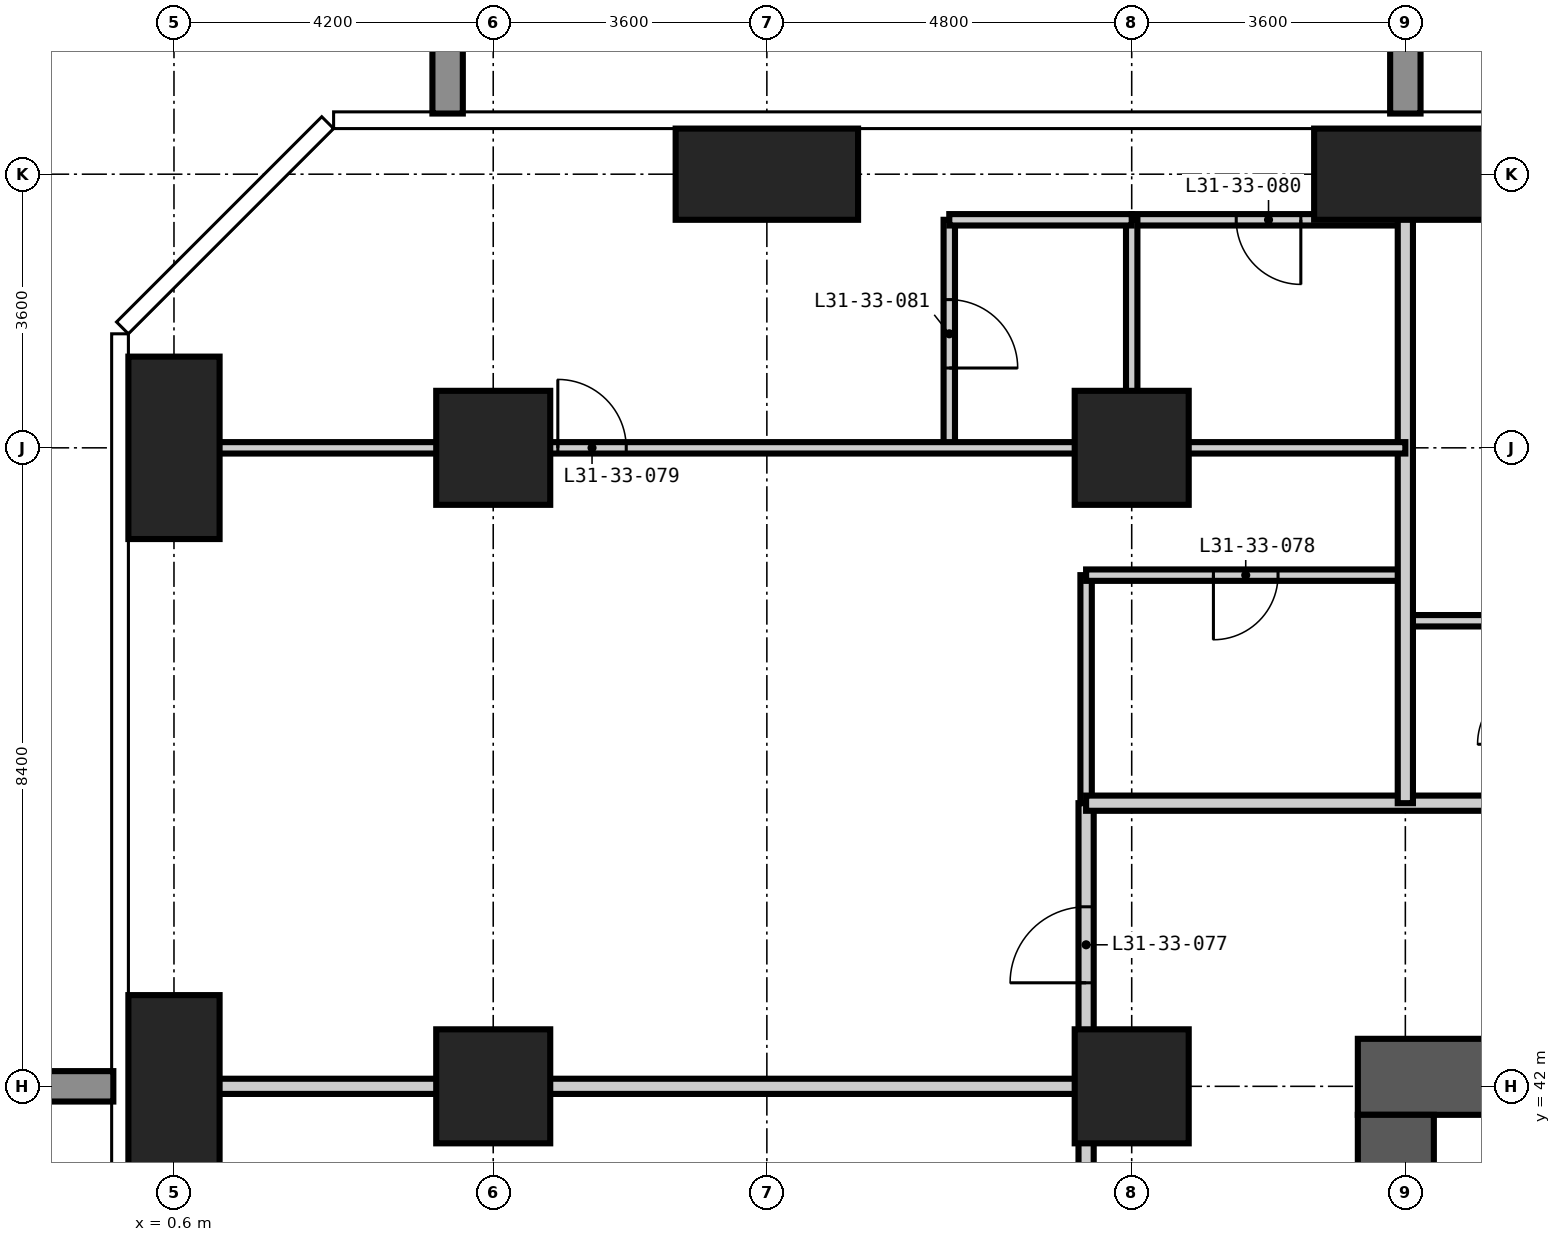
"""IFC4 building model, lengths in metres.
Left out: names, types, materials, properties, quantities, classifications, styles, units other than length and angle.
Written with IfcOpenShell. Run it as: python <this file> out.ifc"""

import sys

from ifc_helpers import new_model, si_unit, direction, frame, frame_2d, origin, origin_2d, place, context, subcontext, project, spatial, rectangle, extrude, element, fill, save


model = new_model("IFC4")
c1 = context("Model", 3, precision=1e-05, world=origin(), true_north=direction((0.0, 1.0)))
c2 = subcontext(c1, "Body", "Model", "MODEL_VIEW")
j1 = project(units=[si_unit("LENGTHUNIT", "METRE"), si_unit("PLANEANGLEUNIT", "RADIAN")], contexts=[c1])
p1 = place(None, origin())
s1 = spatial("IfcSite", under=j1, at=p1, CompositionType="ELEMENT")
p2 = place(p1, origin())
s2 = spatial("IfcBuilding", under=s1, at=p2, CompositionType="ELEMENT")
p3 = place(p2, frame((0.0, 0.0, 122.4)))
s3 = spatial("IfcBuildingStorey", under=s2, at=p3, CompositionType="ELEMENT", Elevation=122.4)
for number, where, z_axis, x_axis in (
    (1, (0.6, 42.0, -0.35), (0.0, 0.0, 1.0), (1.0, 0.0, 0.0)),
    (2, (0.6, 50.4, -0.35), (0.0, 0.0, 1.0), (1.0, 0.0, 0.0)),
):
    element("IfcColumn", number, at=place(p3, frame(where, z_axis=z_axis, x_axis=x_axis)), inside=s3, PredefinedType="COLUMN", context=c2, shape_type="SweptSolid", body=[
        extrude(rectangle(XDim=1.2, YDim=2.4, at=origin_2d()), origin(), (0.0, 0.0, 1.0), 3.6),
    ])
for number, where, z_axis, x_axis in (
    (3, (4.8, 42.0, -0.35), (0.0, 0.0, 1.0), (1.0, 0.0, 0.0)),
    (4, (4.8, 50.4, -0.35), (0.0, 0.0, 1.0), (1.0, 0.0, 0.0)),
):
    element("IfcColumn", number, at=place(p3, frame(where, z_axis=z_axis, x_axis=x_axis)), inside=s3, PredefinedType="COLUMN", context=c2, shape_type="SweptSolid", body=[
        extrude(rectangle(XDim=1.5, YDim=1.5, at=origin_2d()), origin(), (0.0, 0.0, 1.0), 3.6),
    ])
p4 = place(p3, frame((8.4, 54.0, -0.35), z_axis=(0.0, 0.0, 1.0), x_axis=(1.0, 0.0, 0.0)))
e5 = element("IfcColumn", 5, at=p4, inside=s3, PredefinedType="COLUMN", context=c2, shape_type="SweptSolid", body=[
    extrude(rectangle(XDim=2.4, YDim=1.2, at=origin_2d()), origin(), (0.0, 0.0, 1.0), 3.6),
])
for number, where, z_axis, x_axis in (
    (6, (13.2, 42.0, -0.35), (0.0, 0.0, 1.0), (1.0, 0.0, 0.0)),
    (7, (13.2, 50.4, -0.35), (0.0, 0.0, 1.0), (1.0, 0.0, 0.0)),
):
    element("IfcColumn", number, at=place(p3, frame(where, z_axis=z_axis, x_axis=x_axis)), inside=s3, PredefinedType="COLUMN", context=c2, shape_type="SweptSolid", body=[
        extrude(rectangle(XDim=1.5, YDim=1.5, at=origin_2d()), origin(), (0.0, 0.0, 1.0), 3.6),
    ])
p5 = place(p3, frame((16.8, 54.0, -0.35), z_axis=(0.0, 0.0, 1.0), x_axis=(1.0, 0.0, 0.0)))
e8 = element("IfcColumn", 8, at=p5, inside=s3, PredefinedType="COLUMN", context=c2, shape_type="SweptSolid", body=[
    extrude(rectangle(XDim=2.4, YDim=1.2, at=origin_2d()), origin(), (0.0, 0.0, 1.0), 3.6),
])
p6 = place(p3, frame((42.625, 42.125, -0.35), z_axis=(0.0, 0.0, 1.0), x_axis=(-1.0, 0.0, 0.0)))
e9 = element("IfcWall", 9, at=p6, inside=s3, PredefinedType="SHEAR", context=c2, shape_type="SweptSolid", body=[
    extrude(rectangle(XDim=26.45, YDim=1.0, at=frame_2d((13.225, 0.0))), origin(), (0.0, 0.0, 1.0), 3.6),
])
p7 = place(p6, frame((21.125, 0.0, 0.35)))
e10 = element("IfcOpeningElement", 10, at=p7, cuts=e9, PredefinedType="OPENING", context=c2, shape_type="SweptSolid", body=[
    extrude(rectangle(XDim=1.0, YDim=2.1, at=frame_2d((0.5, 1.05))), frame((0.0, 0.51, 0.0), z_axis=(0.0, -1.0, 0.0), x_axis=(1.0, 0.0, 0.0)), (0.0, 0.0, 1.0), 1.02),
])
p8 = place(p6, frame((10.525, 0.0, 0.35)))
e11 = element("IfcOpeningElement", 11, at=p8, cuts=e9, PredefinedType="OPENING", context=c2, shape_type="SweptSolid", body=[
    extrude(rectangle(XDim=1.2, YDim=2.2, at=frame_2d((0.6, 1.1))), frame((0.0, 0.51, 0.0), z_axis=(0.0, -1.0, 0.0), x_axis=(1.0, 0.0, 0.0)), (0.0, 0.0, 1.0), 1.02),
])
p9 = place(p3, frame((16.675, 41.625, -0.35), z_axis=(0.0, 0.0, 1.0), x_axis=(0.0, -1.0, 0.0)))
e12 = element("IfcWall", 12, at=p9, inside=s3, PredefinedType="SHEAR", context=c2, shape_type="SweptSolid", body=[
    extrude(rectangle(XDim=24.45, YDim=1.0, at=frame_2d((12.225, 0.0))), origin(), (0.0, 0.0, 1.0), 3.6),
])
p10 = place(p9, frame((11.325, 0.0, 0.35)))
e13 = element("IfcOpeningElement", 13, at=p10, cuts=e12, PredefinedType="OPENING", context=c2, shape_type="SweptSolid", body=[
    extrude(rectangle(XDim=1.8, YDim=2.2, at=frame_2d((0.9, 1.1))), frame((0.0, 0.51, 0.0), z_axis=(0.0, -1.0, 0.0), x_axis=(1.0, 0.0, 0.0)), (0.0, 0.0, 1.0), 1.02),
])
p11 = place(p9, frame((20.125, 0.0, 0.35)))
e14 = element("IfcOpeningElement", 14, at=p11, cuts=e12, PredefinedType="OPENING", context=c2, shape_type="SweptSolid", body=[
    extrude(rectangle(XDim=1.0, YDim=2.1, at=frame_2d((0.5, 1.05))), frame((0.0, 0.51, 0.0), z_axis=(0.0, -1.0, 0.0), x_axis=(1.0, 0.0, 0.0)), (0.0, 0.0, 1.0), 1.02),
])
p12 = place(p9, frame((5.425, 0.0, 0.35)))
e15 = element("IfcOpeningElement", 15, at=p12, cuts=e12, PredefinedType="OPENING", context=c2, shape_type="SweptSolid", body=[
    extrude(rectangle(XDim=1.0, YDim=2.1, at=frame_2d((0.5, 1.05))), frame((0.0, 0.51, 0.0), z_axis=(0.0, -1.0, 0.0), x_axis=(1.0, 0.0, 0.0)), (0.0, 0.0, 1.0), 1.02),
])
p13 = place(p3, frame((12.6, 45.725, 0.0), z_axis=(0.0, 0.0, 1.0), x_axis=(0.0, 1.0, 0.0)))
e16 = element("IfcWall", 16, at=p13, inside=s3, PredefinedType="PARTITIONING", context=c2, shape_type="SweptSolid", body=[
    extrude(rectangle(XDim=3.0, YDim=0.15, at=frame_2d((1.5, 0.0))), origin(), (0.0, 0.0, 1.0), 3.25),
])
p14 = place(p3, frame((16.8, 48.125, 0.0), z_axis=(0.0, 0.0, 1.0), x_axis=(1.0, 0.0, 0.0)))
e17 = element("IfcWall", 17, at=p14, inside=s3, PredefinedType="PARTITIONING", context=c2, shape_type="SweptSolid", body=[
    extrude(rectangle(XDim=1.8, YDim=0.15, at=frame_2d((0.9, 0.0))), origin(), (0.0, 0.0, 1.0), 3.25),
])
p15 = place(p3, frame((12.6, 48.725, 0.0), z_axis=(0.0, 0.0, 1.0), x_axis=(1.0, 0.0, 0.0)))
e18 = element("IfcWall", 18, at=p15, inside=s3, PredefinedType="PARTITIONING", context=c2, shape_type="SweptSolid", body=[
    extrude(rectangle(XDim=4.2, YDim=0.15, at=frame_2d((2.1, 0.0))), origin(), (0.0, 0.0, 1.0), 3.25),
])
p16 = place(p15, frame((1.675, 0.0, 0.0)))
e19 = element("IfcOpeningElement", 19, at=p16, cuts=e18, PredefinedType="OPENING", context=c2, shape_type="SweptSolid", body=[
    extrude(rectangle(XDim=0.85, YDim=2.1, at=frame_2d((0.425, 1.05))), frame((0.0, 0.085, 0.0), z_axis=(0.0, -1.0, 0.0), x_axis=(1.0, 0.0, 0.0)), (0.0, 0.0, 1.0), 0.17),
])
p17 = place(p3, frame((13.2, 53.4, 0.0), z_axis=(0.0, 0.0, 1.0), x_axis=(1.0, 0.0, 0.0)))
e20 = element("IfcWall", 20, at=p17, inside=s3, PredefinedType="PARTITIONING", context=c2, shape_type="SweptSolid", body=[
    extrude(rectangle(XDim=3.6, YDim=0.15, at=frame_2d((1.8, 0.0))), origin(), (0.0, 0.0, 1.0), 3.25),
])
p18 = place(p17, frame((1.375, 0.0, 0.0)))
e21 = element("IfcOpeningElement", 21, at=p18, cuts=e20, PredefinedType="OPENING", context=c2, shape_type="SweptSolid", body=[
    extrude(rectangle(XDim=0.85, YDim=2.1, at=frame_2d((0.425, 1.05))), frame((0.0, 0.085, 0.0), z_axis=(0.0, -1.0, 0.0), x_axis=(1.0, 0.0, 0.0)), (0.0, 0.0, 1.0), 0.17),
])
p19 = place(p3, frame((12.6, 13.675, 0.0), z_axis=(0.0, 0.0, 1.0), x_axis=(0.0, 1.0, 0.0)))
e22 = element("IfcWall", 22, at=p19, inside=s3, PredefinedType="PARTITIONING", context=c2, shape_type="SweptSolid", body=[
    extrude(rectangle(XDim=32.05, YDim=0.2, at=frame_2d((16.025, 0.0))), origin(), (0.0, 0.0, 1.0), 3.25),
])
p20 = place(p19, frame((6.825, 0.0, 0.0)))
e23 = element("IfcOpeningElement", 23, at=p20, cuts=e22, PredefinedType="OPENING", context=c2, shape_type="SweptSolid", body=[
    extrude(rectangle(XDim=1.0, YDim=2.2, at=frame_2d((0.5, 1.1))), frame((0.0, 0.11, 0.0), z_axis=(0.0, -1.0, 0.0), x_axis=(1.0, 0.0, 0.0)), (0.0, 0.0, 1.0), 0.22),
])
p21 = place(p19, frame((15.225, 0.0, 0.0)))
e24 = element("IfcOpeningElement", 24, at=p21, cuts=e22, PredefinedType="OPENING", context=c2, shape_type="SweptSolid", body=[
    extrude(rectangle(XDim=1.0, YDim=2.2, at=frame_2d((0.5, 1.1))), frame((0.0, 0.11, 0.0), z_axis=(0.0, -1.0, 0.0), x_axis=(1.0, 0.0, 0.0)), (0.0, 0.0, 1.0), 0.22),
])
p22 = place(p19, frame((23.625, 0.0, 0.0)))
e25 = element("IfcOpeningElement", 25, at=p22, cuts=e22, PredefinedType="OPENING", context=c2, shape_type="SweptSolid", body=[
    extrude(rectangle(XDim=1.0, YDim=2.2, at=frame_2d((0.5, 1.1))), frame((0.0, 0.11, 0.0), z_axis=(0.0, -1.0, 0.0), x_axis=(1.0, 0.0, 0.0)), (0.0, 0.0, 1.0), 0.22),
])
p23 = place(p19, frame((1.063, 0.0, 0.0)))
e26 = element("IfcOpeningElement", 26, at=p23, cuts=e22, PredefinedType="OPENING", context=c2, shape_type="SweptSolid", body=[
    extrude(rectangle(XDim=1.0, YDim=2.2, at=frame_2d((0.5, 1.1))), frame((0.0, 0.11, 0.0), z_axis=(0.0, -1.0, 0.0), x_axis=(1.0, 0.0, 0.0)), (0.0, 0.0, 1.0), 0.22),
])
p24 = place(p19, frame((29.687, 0.0, 0.0)))
e27 = element("IfcOpeningElement", 27, at=p24, cuts=e22, PredefinedType="OPENING", context=c2, shape_type="SweptSolid", body=[
    extrude(rectangle(XDim=1.0, YDim=2.2, at=frame_2d((0.5, 1.1))), frame((0.0, 0.11, 0.0), z_axis=(0.0, -1.0, 0.0), x_axis=(1.0, 0.0, 0.0)), (0.0, 0.0, 1.0), 0.22),
])
p25 = place(p3, frame((12.6, 45.725, 0.0), z_axis=(0.0, 0.0, 1.0), x_axis=(1.0, 0.0, 0.0)))
e28 = element("IfcWall", 28, at=p25, inside=s3, PredefinedType="PARTITIONING", context=c2, shape_type="SweptSolid", body=[
    extrude(rectangle(XDim=31.925, YDim=0.2, at=frame_2d((15.962, 0.0))), origin(), (0.0, 0.0, 1.0), 3.25),
])
p26 = place(p25, frame((6.7, 0.0, 0.0)))
e29 = element("IfcOpeningElement", 29, at=p26, cuts=e28, PredefinedType="OPENING", context=c2, shape_type="SweptSolid", body=[
    extrude(rectangle(XDim=1.0, YDim=2.2, at=frame_2d((0.5, 1.1))), frame((0.0, 0.11, 0.0), z_axis=(0.0, -1.0, 0.0), x_axis=(1.0, 0.0, 0.0)), (0.0, 0.0, 1.0), 0.22),
])
p27 = place(p25, frame((17.5, 0.0, 0.0)))
e30 = element("IfcOpeningElement", 30, at=p27, cuts=e28, PredefinedType="OPENING", context=c2, shape_type="SweptSolid", body=[
    extrude(rectangle(XDim=1.0, YDim=2.2, at=frame_2d((0.5, 1.1))), frame((0.0, 0.11, 0.0), z_axis=(0.0, -1.0, 0.0), x_axis=(1.0, 0.0, 0.0)), (0.0, 0.0, 1.0), 0.22),
])
p28 = place(p25, frame((23.5, 0.0, 0.0)))
e31 = element("IfcOpeningElement", 31, at=p28, cuts=e28, PredefinedType="OPENING", context=c2, shape_type="SweptSolid", body=[
    extrude(rectangle(XDim=1.0, YDim=2.2, at=frame_2d((0.5, 1.1))), frame((0.0, 0.11, 0.0), z_axis=(0.0, -1.0, 0.0), x_axis=(1.0, 0.0, 0.0)), (0.0, 0.0, 1.0), 0.22),
])
p29 = place(p3, frame((16.8, 45.725, 0.0), z_axis=(0.0, 0.0, 1.0), x_axis=(0.0, 1.0, 0.0)))
e32 = element("IfcWall", 32, at=p29, inside=s3, PredefinedType="PARTITIONING", context=c2, shape_type="SweptSolid", body=[
    extrude(rectangle(XDim=8.893, YDim=0.2, at=frame_2d((4.446, 0.0))), origin(), (0.0, 0.0, 1.0), 3.25),
])
p30 = place(p3, frame((-0.018, 42.0, 0.0), z_axis=(0.0, 0.0, 1.0), x_axis=(1.0, 0.0, 0.0)))
e33 = element("IfcWall", 33, at=p30, inside=s3, PredefinedType="PARTITIONING", context=c2, shape_type="SweptSolid", body=[
    extrude(rectangle(XDim=12.618, YDim=0.2, at=frame_2d((6.309, 0.0))), origin(), (0.0, 0.0, 1.0), 3.25),
])
p31 = place(p3, frame((10.8, 50.4, 0.0), z_axis=(0.0, 0.0, 1.0), x_axis=(0.0, 1.0, 0.0)))
e34 = element("IfcWall", 34, at=p31, inside=s3, PredefinedType="PARTITIONING", context=c2, shape_type="SweptSolid", body=[
    extrude(rectangle(XDim=3.0, YDim=0.15, at=frame_2d((1.5, 0.0))), origin(), (0.0, 0.0, 1.0), 3.25),
])
p32 = place(p31, frame((1.05, 0.0, 0.0)))
e35 = element("IfcOpeningElement", 35, at=p32, cuts=e34, PredefinedType="OPENING", context=c2, shape_type="SweptSolid", body=[
    extrude(rectangle(XDim=0.9, YDim=2.1, at=frame_2d((0.45, 1.05))), frame((0.0, 0.085, 0.0), z_axis=(0.0, -1.0, 0.0), x_axis=(1.0, 0.0, 0.0)), (0.0, 0.0, 1.0), 0.17),
])
p33 = place(p3, frame((13.2, 50.4, 0.0), z_axis=(0.0, 0.0, 1.0), x_axis=(0.0, 1.0, 0.0)))
e36 = element("IfcWall", 36, at=p33, inside=s3, PredefinedType="PARTITIONING", context=c2, shape_type="SweptSolid", body=[
    extrude(rectangle(XDim=3.0, YDim=0.15, at=frame_2d((1.5, 0.0))), origin(), (0.0, 0.0, 1.0), 3.25),
])
p34 = place(p3, frame((-0.018, 50.4, 0.0), z_axis=(0.0, 0.0, 1.0), x_axis=(1.0, 0.0, 0.0)))
e37 = element("IfcWall", 37, at=p34, inside=s3, PredefinedType="PARTITIONING", context=c2, shape_type="SweptSolid", body=[
    extrude(rectangle(XDim=16.818, YDim=0.15, at=frame_2d((8.409, 0.0))), origin(), (0.0, 0.0, 1.0), 3.25),
])
p35 = place(p34, frame((5.668, 0.0, 0.0)))
e38 = element("IfcOpeningElement", 38, at=p35, cuts=e37, PredefinedType="OPENING", context=c2, shape_type="SweptSolid", body=[
    extrude(rectangle(XDim=0.9, YDim=2.1, at=frame_2d((0.45, 1.05))), frame((0.0, 0.085, 0.0), z_axis=(0.0, -1.0, 0.0), x_axis=(1.0, 0.0, 0.0)), (0.0, 0.0, 1.0), 0.17),
])
p36 = place(p3, frame((10.8, 53.4, 0.0), z_axis=(0.0, 0.0, 1.0), x_axis=(1.0, 0.0, 0.0)))
e39 = element("IfcWall", 39, at=p36, inside=s3, PredefinedType="PARTITIONING", context=c2, shape_type="SweptSolid", body=[
    extrude(rectangle(XDim=2.4, YDim=0.15, at=frame_2d((1.2, 0.0))), origin(), (0.0, 0.0, 1.0), 3.25),
])
p37 = place(p24, origin())
e40 = element("IfcDoor", 40, at=p37, inside=s3, OperationType="SINGLE_SWING_LEFT", PredefinedType="DOOR", context=c2, shape_type="SweptSolid", body=[
    extrude(rectangle(XDim=1.0, YDim=2.2, at=frame_2d((0.5, 1.1))), frame((0.0, 0.025, 0.0), z_axis=(0.0, -1.0, 0.0), x_axis=(1.0, 0.0, 0.0)), (0.0, 0.0, 1.0), 0.05),
])
fill(e27, e40)
p38 = place(p16, frame((0.85, 0.0, 0.0), z_axis=(0.0, 0.0, 1.0), x_axis=(-1.0, 0.0, 0.0)))
e41 = element("IfcDoor", 41, at=p38, inside=s3, OperationType="SINGLE_SWING_RIGHT", PredefinedType="DOOR", context=c2, shape_type="SweptSolid", body=[
    extrude(rectangle(XDim=0.85, YDim=2.1, at=frame_2d((0.425, 1.05))), frame((0.0, 0.025, 0.0), z_axis=(0.0, -1.0, 0.0), x_axis=(1.0, 0.0, 0.0)), (0.0, 0.0, 1.0), 0.05),
])
fill(e19, e41)
p39 = place(p35, origin())
e42 = element("IfcDoor", 42, at=p39, inside=s3, OperationType="SINGLE_SWING_LEFT", PredefinedType="DOOR", context=c2, shape_type="SweptSolid", body=[
    extrude(rectangle(XDim=0.9, YDim=2.1, at=frame_2d((0.45, 1.05))), frame((0.0, 0.025, 0.0), z_axis=(0.0, -1.0, 0.0), x_axis=(1.0, 0.0, 0.0)), (0.0, 0.0, 1.0), 0.05),
])
fill(e38, e42)
p40 = place(p18, frame((0.85, 0.0, 0.0), z_axis=(0.0, 0.0, 1.0), x_axis=(-1.0, 0.0, 0.0)))
e43 = element("IfcDoor", 43, at=p40, inside=s3, OperationType="SINGLE_SWING_LEFT", PredefinedType="DOOR", context=c2, shape_type="SweptSolid", body=[
    extrude(rectangle(XDim=0.85, YDim=2.1, at=frame_2d((0.425, 1.05))), frame((0.0, 0.025, 0.0), z_axis=(0.0, -1.0, 0.0), x_axis=(1.0, 0.0, 0.0)), (0.0, 0.0, 1.0), 0.05),
])
fill(e21, e43)
p41 = place(p32, frame((0.9, 0.0, 0.0), z_axis=(0.0, 0.0, 1.0), x_axis=(-1.0, 0.0, 0.0)))
e44 = element("IfcDoor", 44, at=p41, inside=s3, OperationType="SINGLE_SWING_RIGHT", PredefinedType="DOOR", context=c2, shape_type="SweptSolid", body=[
    extrude(rectangle(XDim=0.9, YDim=2.1, at=frame_2d((0.45, 1.05))), frame((0.0, 0.025, 0.0), z_axis=(0.0, -1.0, 0.0), x_axis=(1.0, 0.0, 0.0)), (0.0, 0.0, 1.0), 0.05),
])
fill(e35, e44)
save(model, sys.argv[1])
